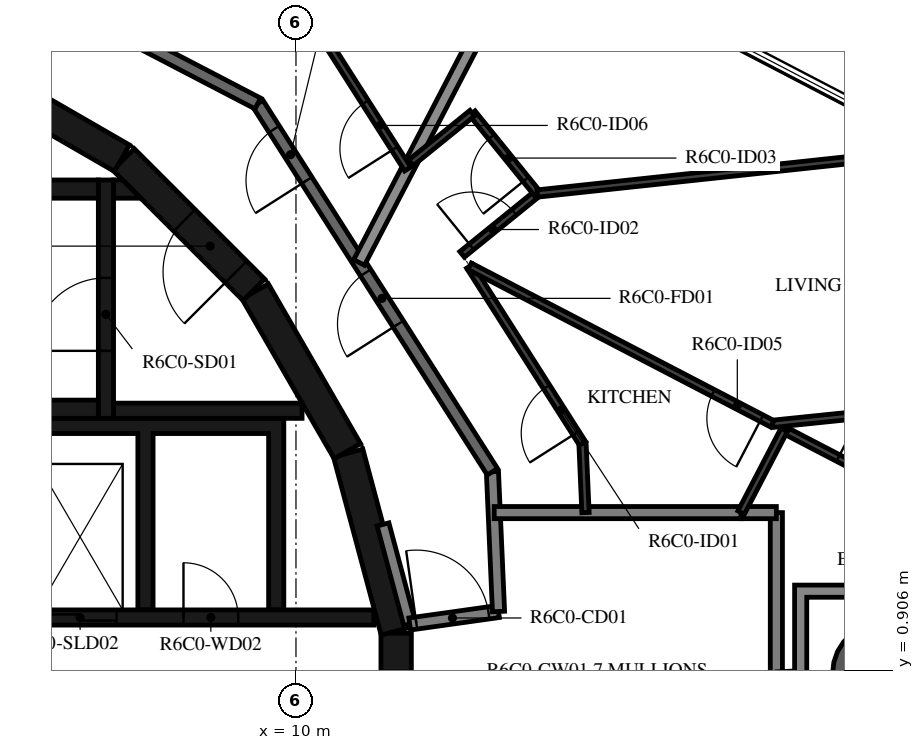
"""IFC4 building model, lengths in metres.
Left out: names, types, materials, properties, quantities, classifications, styles, units other than length and angle.
Written with IfcOpenShell. Run it as: python <this file> out.ifc"""

import sys

from ifc_helpers import new_model, si_unit, direction, frame, frame_2d, origin, origin_2d, place, context, subcontext, project, spatial, polyline, rectangle, hollow_circle, outline, extrude, element, fill, save


model = new_model("IFC4")
c1 = context("Model", 3, precision=1e-05, world=origin(), true_north=direction((0.0, 1.0)))
c2 = subcontext(c1, "Body", "Model", "MODEL_VIEW")
j1 = project(units=[si_unit("LENGTHUNIT", "METRE"), si_unit("PLANEANGLEUNIT", "RADIAN")], contexts=[c1])
p1 = place(None, origin())
s1 = spatial("IfcSite", under=j1, at=p1, CompositionType="ELEMENT")
p2 = place(p1, origin())
s2 = spatial("IfcBuilding", under=s1, at=p2, CompositionType="ELEMENT")
p3 = place(p2, frame((0.0, 0.0, 247.7)))
s3 = spatial("IfcBuildingStorey", under=s2, at=p3, CompositionType="ELEMENT", Elevation=247.7)
p4 = place(p3, frame((19.65, 0.858, -0.38), z_axis=(0.0, 0.0, 1.0), x_axis=(1.0, 0.0, 0.0)))
e1 = element("IfcColumn", 1, at=p4, inside=s3, PredefinedType="COLUMN", context=c2, shape_type="SweptSolid", body=[
    extrude(hollow_circle(Radius=0.825, WallThickness=0.04, at=origin_2d()), origin(), (0.0, 0.0, 1.0), 3.5),
])
p5 = place(p3, frame((11.647, -1.516, 0.0), z_axis=(0.0, 0.0, 1.0), x_axis=(0.0, 1.0, 0.0)))
e2 = element("IfcWall", 2, at=p5, inside=s3, PredefinedType="SHEAR", context=c2, shape_type="SweptSolid", body=[
    extrude(rectangle(XDim=3.033, YDim=0.5, at=frame_2d((1.516, 0.0))), origin(), (0.0, 0.0, 1.0), 3.12),
])
p6 = place(p5, frame((0.616, 0.0, 0.0)))
e3 = element("IfcOpeningElement", 3, at=p6, cuts=e2, PredefinedType="OPENING", context=c2, shape_type="SweptSolid", body=[
    extrude(rectangle(XDim=1.8, YDim=2.1, at=frame_2d((0.9, 1.05))), frame((0.0, 0.26, 0.0), z_axis=(0.0, -1.0, 0.0), x_axis=(1.0, 0.0, 0.0)), (0.0, 0.0, 1.0), 0.52),
])
for number, where, z_axis, x_axis in (
    (4, (11.643, 1.55, 0.0), (0.0, 0.0, 1.0), (-0.259, 0.966, 0.0)),
    (5, (10.845, 4.51, 0.0), (0.0, 0.0, 1.0), (-0.5, 0.866, 0.0)),
):
    element("IfcWall", number, at=place(p3, frame(where, z_axis=z_axis, x_axis=x_axis)), inside=s3, PredefinedType="SHEAR", context=c2, shape_type="SweptSolid", body=[
        extrude(rectangle(XDim=3.033, YDim=0.5, at=frame_2d((1.516, 0.0))), origin(), (0.0, 0.0, 1.0), 3.12),
    ])
p7 = place(p3, frame((9.308, 7.164, 0.0), z_axis=(0.0, 0.0, 1.0), x_axis=(-0.707106781187, 0.707106781187, 0.0)))
e6 = element("IfcWall", 6, at=p7, inside=s3, PredefinedType="SHEAR", context=c2, shape_type="SweptSolid", body=[
    extrude(rectangle(XDim=3.032, YDim=0.5, at=frame_2d((1.516, 0.0))), origin(), (0.0, 0.0, 1.0), 3.12),
])
p8 = place(p7, frame((0.416, 0.0, 0.0)))
e7 = element("IfcOpeningElement", 7, at=p8, cuts=e6, PredefinedType="OPENING", context=c2, shape_type="SweptSolid", body=[
    extrude(rectangle(XDim=1.2, YDim=2.1, at=frame_2d((0.6, 1.05))), frame((0.0, 0.26, 0.0), z_axis=(0.0, -1.0, 0.0), x_axis=(1.0, 0.0, 0.0)), (0.0, 0.0, 1.0), 0.52),
])
p9 = place(p3, frame((7.137, 9.329, 0.0), z_axis=(0.0, 0.0, 1.0), x_axis=(-0.865975092491, 0.500087131594, 0.0)))
e8 = element("IfcWall", 8, at=p9, inside=s3, PredefinedType="SHEAR", context=c2, shape_type="SweptSolid", body=[
    extrude(rectangle(XDim=3.033, YDim=0.5, at=frame_2d((1.516, 0.0))), origin(), (0.0, 0.0, 1.0), 3.12),
])
for number, where, z_axis, x_axis in (
    (9, (0.0, 5.2, 0.0), (0.0, 0.0, 1.0), (1.0, 0.0, 0.0)),
    (10, (0.0, 8.82, 0.0), (0.0, 0.0, 1.0), (1.0, 0.0, 0.0)),
):
    element("IfcWall", number, at=place(p3, frame(where, z_axis=z_axis, x_axis=x_axis)), inside=s3, PredefinedType="SHEAR", context=c2, shape_type="SweptSolid", body=[
        extrude(rectangle(XDim=6.75, YDim=0.3, at=frame_2d((3.375, 0.0))), origin(), (0.0, 0.0, 1.0), 3.12),
    ])
p10 = place(p3, frame((6.875, 5.05, 0.0), z_axis=(0.0, 0.0, 1.0), x_axis=(0.0, 1.0, 0.0)))
e11 = element("IfcWall", 11, at=p10, inside=s3, PredefinedType="SHEAR", context=c2, shape_type="SweptSolid", body=[
    extrude(rectangle(XDim=3.92, YDim=0.25, at=frame_2d((1.96, 0.0))), origin(), (0.0, 0.0, 1.0), 3.12),
])
p11 = place(p10, frame((1.11, 0.0, 0.0)))
e12 = element("IfcOpeningElement", 12, at=p11, cuts=e11, PredefinedType="OPENING", context=c2, shape_type="SweptSolid", body=[
    extrude(rectangle(XDim=1.2, YDim=2.1, at=frame_2d((0.6, 1.05))), frame((0.0, 0.135, 0.0), z_axis=(0.0, -1.0, 0.0), x_axis=(1.0, 0.0, 0.0)), (0.0, 0.0, 1.0), 0.27),
])
p12 = place(p3, frame((7.0, 5.175, 0.0), z_axis=(0.0, 0.0, 1.0), x_axis=(1.0, 0.0, 0.0)))
e13 = element("IfcWall", 13, at=p12, inside=s3, PredefinedType="SHEAR", context=c2, shape_type="SweptSolid", body=[
    extrude(rectangle(XDim=3.1, YDim=0.25, at=frame_2d((1.55, 0.0))), origin(), (0.0, 0.0, 1.0), 3.12),
])
p13 = place(p3, origin())
e14 = element("IfcWall", 14, at=p13, inside=s3, PredefinedType="SHEAR", context=c2, shape_type="SweptSolid", body=[
    extrude(outline(polyline([(7.448, 8.67), (7.0, 8.67), (7.0, 8.97), (7.148, 8.97), (7.448, 8.67)])), origin(), (0.0, 0.0, 1.0), 3.12),
])
p14 = place(p3, origin())
e15 = element("IfcWall", 15, at=p14, inside=s3, PredefinedType="SHEAR", context=c2, shape_type="SweptSolid", body=[
    extrude(outline(polyline([(-9.55, 4.8), (-1.2, 4.8), (-1.2, 1.9), (-0.95, 1.9), (-0.95, 4.8), (0.95, 4.8), (0.95, 1.9), (1.2, 1.9), (1.2, 4.8), (3.1, 4.8), (3.1, 1.9), (3.35, 1.9), (3.35, 4.8), (5.25, 4.8), (5.25, 1.9), (5.5, 1.9), (5.5, 4.8), (7.4, 4.8), (7.4, 1.9), (7.65, 1.9), (7.65, 4.8), (9.55, 4.8), (9.55, 1.9), (9.8, 1.9), (9.8, 4.8), (9.8, 5.05), (-9.8, 5.05), (-9.8, 4.8), (-9.8, 1.9), (-9.55, 1.9), (-9.55, 4.8)])), origin(), (0.0, 0.0, 1.0), 3.12),
])
p15 = place(p3, frame((3.35, 1.775, 0.0), z_axis=(0.0, 0.0, 1.0), x_axis=(1.0, 0.0, 0.0)))
e16 = element("IfcWall", 16, at=p15, inside=s3, PredefinedType="SHEAR", context=c2, shape_type="SweptSolid", body=[
    extrude(rectangle(XDim=7.93, YDim=0.25, at=frame_2d((3.965, 0.0))), origin(), (0.0, 0.0, 1.0), 3.12),
])
p16 = place(p15, frame((0.35, 0.0, 0.0)))
e17 = element("IfcOpeningElement", 17, at=p16, cuts=e16, PredefinedType="OPENING", context=c2, shape_type="SweptSolid", body=[
    extrude(rectangle(XDim=1.2, YDim=2.4, at=frame_2d((0.6, 1.2))), frame((0.0, 0.135, 0.0), z_axis=(0.0, -1.0, 0.0), x_axis=(1.0, 0.0, 0.0)), (0.0, 0.0, 1.0), 0.27),
])
p17 = place(p15, frame((2.5, 0.0, 0.0)))
e18 = element("IfcOpeningElement", 18, at=p17, cuts=e16, PredefinedType="OPENING", context=c2, shape_type="SweptSolid", body=[
    extrude(rectangle(XDim=1.2, YDim=2.4, at=frame_2d((0.6, 1.2))), frame((0.0, 0.135, 0.0), z_axis=(0.0, -1.0, 0.0), x_axis=(1.0, 0.0, 0.0)), (0.0, 0.0, 1.0), 0.27),
])
p18 = place(p15, frame((4.8, 0.0, 0.0)))
e19 = element("IfcOpeningElement", 19, at=p18, cuts=e16, PredefinedType="OPENING", context=c2, shape_type="SweptSolid", body=[
    extrude(rectangle(XDim=0.9, YDim=2.1, at=frame_2d((0.45, 1.05))), frame((0.0, 0.135, 0.0), z_axis=(0.0, -1.0, 0.0), x_axis=(1.0, 0.0, 0.0)), (0.0, 0.0, 1.0), 0.27),
])
p19 = place(p3, frame((11.87, 1.668, 0.0), z_axis=(0.0, 0.0, 1.0), x_axis=(-0.258836880648, 0.965921047093, 0.0)))
e20 = element("IfcWall", 20, at=p19, inside=s3, PredefinedType="STANDARD", context=c2, shape_type="SweptSolid", body=[
    extrude(rectangle(XDim=1.695, YDim=0.2, at=frame_2d((0.848, 0.0))), origin(), (0.0, 0.0, 1.0), 3.12),
])
p20 = place(p3, frame((11.87, 1.668, 0.0), z_axis=(0.0, 0.0, 1.0), x_axis=(0.990267985606, 0.139173692496, 0.0)))
e21 = element("IfcWall", 21, at=p20, inside=s3, PredefinedType="STANDARD", context=c2, shape_type="SweptSolid", body=[
    extrude(rectangle(XDim=1.475, YDim=0.2, at=frame_2d((0.738, 0.0))), origin(), (0.0, 0.0, 1.0), 3.12),
])
p21 = place(p20, frame((0.11, 0.0, 0.0)))
e22 = element("IfcOpeningElement", 22, at=p21, cuts=e21, PredefinedType="OPENING", context=c2, shape_type="SweptSolid", body=[
    extrude(rectangle(XDim=1.2, YDim=2.1, at=frame_2d((0.6, 1.05))), frame((0.0, 0.11, 0.0), z_axis=(0.0, -1.0, 0.0), x_axis=(1.0, 0.0, 0.0)), (0.0, 0.0, 1.0), 0.22),
])
p22 = place(p3, frame((13.331, 1.874, 0.0), z_axis=(0.0, 0.0, 1.0), x_axis=(-0.043621457762, 0.999048131184, 0.0)))
e23 = element("IfcWall", 23, at=p22, inside=s3, PredefinedType="STANDARD", context=c2, shape_type="SweptSolid", body=[
    extrude(rectangle(XDim=2.3, YDim=0.2, at=frame_2d((1.15, 0.0))), origin(), (0.0, 0.0, 1.0), 3.12),
])
p23 = place(p3, frame((13.231, 4.172, 0.0), z_axis=(0.0, 0.0, 1.0), x_axis=(-0.537304397561, 0.843388394728, 0.0)))
e24 = element("IfcWall", 24, at=p23, inside=s3, PredefinedType="STANDARD", context=c2, shape_type="SweptSolid", body=[
    extrude(rectangle(XDim=7.181, YDim=0.2, at=frame_2d((3.59, 0.0))), origin(), (0.0, 0.0, 1.0), 3.12),
])
p24 = place(p23, frame((2.881, 0.0, 0.0)))
e25 = element("IfcOpeningElement", 25, at=p24, cuts=e24, PredefinedType="OPENING", context=c2, shape_type="SweptSolid", body=[
    extrude(rectangle(XDim=1.0, YDim=2.1, at=frame_2d((0.5, 1.05))), frame((0.0, 0.11, 0.0), z_axis=(0.0, -1.0, 0.0), x_axis=(1.0, 0.0, 0.0)), (0.0, 0.0, 1.0), 0.22),
])
p25 = place(p23, frame((5.681, 0.0, 0.0)))
e26 = element("IfcOpeningElement", 26, at=p25, cuts=e24, PredefinedType="OPENING", context=c2, shape_type="SweptSolid", body=[
    extrude(rectangle(XDim=1.0, YDim=2.1, at=frame_2d((0.5, 1.05))), frame((0.0, 0.11, 0.0), z_axis=(0.0, -1.0, 0.0), x_axis=(1.0, 0.0, 0.0)), (0.0, 0.0, 1.0), 0.22),
])
p26 = place(p3, frame((9.372, 10.228, 0.0), z_axis=(0.0, 0.0, 1.0), x_axis=(-0.887005184532, 0.461759464021, 0.0)))
e27 = element("IfcWall", 27, at=p26, inside=s3, PredefinedType="STANDARD", context=c2, shape_type="SweptSolid", body=[
    extrude(rectangle(XDim=7.181, YDim=0.2, at=frame_2d((3.591, 0.0))), origin(), (0.0, 0.0, 1.0), 3.12),
])
p27 = place(p3, frame((17.321, 3.5, 0.0), z_axis=(0.0, 0.0, 1.0), x_axis=(-1.0, 0.0, 0.0)))
e28 = element("IfcWall", 28, at=p27, inside=s3, PredefinedType="STANDARD", context=c2, shape_type="SweptSolid", body=[
    extrude(rectangle(XDim=4.061, YDim=0.2, at=frame_2d((2.03, 0.0))), origin(), (0.0, 0.0, 1.0), 3.12),
])
p28 = place(p3, frame((17.9, -1.772, 0.0), z_axis=(0.0, 0.0, 1.0), x_axis=(0.0, 1.0, 0.0)))
e29 = element("IfcWall", 29, at=p28, inside=s3, PredefinedType="STANDARD", context=c2, shape_type="SweptSolid", body=[
    extrude(rectangle(XDim=5.272, YDim=0.2, at=frame_2d((2.636, 0.0))), origin(), (0.0, 0.0, 1.0), 3.12),
])
p29 = place(p3, frame((17.9, 3.5, 0.0), z_axis=(0.0, 0.0, 1.0), x_axis=(-1.0, 0.0, 0.0)))
e30 = element("IfcWall", 30, at=p29, inside=s3, PredefinedType="STANDARD", context=c2, shape_type="SweptSolid", body=[
    extrude(rectangle(XDim=0.579, YDim=0.2, at=frame_2d((0.29, 0.0))), origin(), (0.0, 0.0, 1.0), 3.12),
])
p30 = place(p3, frame((13.801, 12.922, 0.0), z_axis=(0.0, 0.0, 1.0), x_axis=(-0.461726485624, -0.887022351733, 0.0)))
e31 = element("IfcWall", 31, at=p30, inside=s3, PredefinedType="STANDARD", context=c2, shape_type="SweptSolid", body=[
    extrude(rectangle(XDim=5.984, YDim=0.2, at=frame_2d((2.992, 0.0))), origin(), (0.0, 0.0, 1.0), 2.73),
])
p31 = place(p3, frame((14.761, 3.5, 0.0), z_axis=(0.0, 0.0, 1.0), x_axis=(-0.04369750018, 0.999044808043, 0.0)))
e32 = element("IfcWall", 32, at=p31, inside=s3, PredefinedType="PARTITIONING", context=c2, shape_type="SweptSolid", body=[
    extrude(rectangle(XDim=1.14, YDim=0.12, at=frame_2d((0.57, 0.0))), origin(), (0.0, 0.0, 1.0), 3.12),
])
p32 = place(p3, frame((14.712, 4.639, 0.0), z_axis=(0.0, 0.0, 1.0), x_axis=(-0.537287126609, 0.843399397427, 0.0)))
e33 = element("IfcWall", 33, at=p32, inside=s3, PredefinedType="PARTITIONING", context=c2, shape_type="SweptSolid", body=[
    extrude(rectangle(XDim=3.453, YDim=0.12, at=frame_2d((1.727, 0.0))), origin(), (0.0, 0.0, 1.0), 3.12),
])
p33 = place(p32, frame((0.2, 0.0, 0.0)))
e34 = element("IfcOpeningElement", 34, at=p33, cuts=e33, PredefinedType="OPENING", context=c2, shape_type="SweptSolid", body=[
    extrude(rectangle(XDim=0.9, YDim=2.1, at=frame_2d((0.45, 1.05))), frame((0.0, 0.07, 0.0), z_axis=(0.0, -1.0, 0.0), x_axis=(1.0, 0.0, 0.0)), (0.0, 0.0, 1.0), 0.14),
])
p34 = place(p3, frame((12.732, 7.746, 0.0), z_axis=(0.0, 0.0, 1.0), x_axis=(0.777187694298, 0.62926885179, 0.0)))
e35 = element("IfcWall", 35, at=p34, inside=s3, PredefinedType="PARTITIONING", context=c2, shape_type="SweptSolid", body=[
    extrude(rectangle(XDim=1.591, YDim=0.12, at=frame_2d((0.795, 0.0))), origin(), (0.0, 0.0, 1.0), 3.12),
])
p35 = place(p34, frame((0.2, 0.0, 0.0)))
e36 = element("IfcOpeningElement", 36, at=p35, cuts=e35, PredefinedType="OPENING", context=c2, shape_type="SweptSolid", body=[
    extrude(rectangle(XDim=0.9, YDim=2.1, at=frame_2d((0.45, 1.05))), frame((0.0, 0.07, 0.0), z_axis=(0.0, -1.0, 0.0), x_axis=(1.0, 0.0, 0.0)), (0.0, 0.0, 1.0), 0.14),
])
p36 = place(p3, frame((13.969, 8.747, 0.0), z_axis=(0.0, 0.0, 1.0), x_axis=(-0.629359312443, 0.777114441921, 0.0)))
e37 = element("IfcWall", 37, at=p36, inside=s3, PredefinedType="PARTITIONING", context=c2, shape_type="SweptSolid", body=[
    extrude(rectangle(XDim=1.7, YDim=0.12, at=frame_2d((0.85, 0.0))), origin(), (0.0, 0.0, 1.0), 3.12),
])
p37 = place(p36, frame((0.3, 0.0, 0.0)))
e38 = element("IfcOpeningElement", 38, at=p37, cuts=e37, PredefinedType="OPENING", context=c2, shape_type="SweptSolid", body=[
    extrude(rectangle(XDim=0.9, YDim=2.1, at=frame_2d((0.45, 1.05))), frame((0.0, 0.07, 0.0), z_axis=(0.0, -1.0, 0.0), x_axis=(1.0, 0.0, 0.0)), (0.0, 0.0, 1.0), 0.14),
])
p38 = place(p3, frame((12.898, 10.069, 0.0), z_axis=(0.0, 0.0, 1.0), x_axis=(-0.777069405334, -0.629414918232, 0.0)))
e39 = element("IfcWall", 39, at=p38, inside=s3, PredefinedType="PARTITIONING", context=c2, shape_type="SweptSolid", body=[
    extrude(rectangle(XDim=1.296, YDim=0.12, at=frame_2d((0.648, 0.0))), origin(), (0.0, 0.0, 1.0), 3.12),
])
p39 = place(p3, frame((18.028, 4.859, 0.0), z_axis=(0.0, 0.0, 1.0), x_axis=(0.88702512027, -0.46172116695, 0.0)))
e40 = element("IfcWall", 40, at=p39, inside=s3, PredefinedType="PARTITIONING", context=c2, shape_type="SweptSolid", body=[
    extrude(rectangle(XDim=2.983, YDim=0.12, at=frame_2d((1.492, 0.0))), origin(), (0.0, 0.0, 1.0), 3.12),
])
p40 = place(p39, frame((1.0, 0.0, 0.0)))
e41 = element("IfcOpeningElement", 41, at=p40, cuts=e40, PredefinedType="OPENING", context=c2, shape_type="SweptSolid", body=[
    extrude(rectangle(XDim=0.8, YDim=2.1, at=frame_2d((0.4, 1.05))), frame((0.0, 0.07, 0.0), z_axis=(0.0, -1.0, 0.0), x_axis=(1.0, 0.0, 0.0)), (0.0, 0.0, 1.0), 0.14),
])
p41 = place(p3, frame((25.908, 5.79, 0.0), z_axis=(0.0, 0.0, 1.0), x_axis=(-0.994752982456, -0.102305932847, 0.0)))
e42 = element("IfcWall", 42, at=p41, inside=s3, PredefinedType="PARTITIONING", context=c2, shape_type="SweptSolid", body=[
    extrude(rectangle(XDim=8.116, YDim=0.12, at=frame_2d((4.058, 0.0))), origin(), (0.0, 0.0, 1.0), 3.12),
])
p42 = place(p41, frame((0.6, 0.0, 0.0)))
e43 = element("IfcOpeningElement", 43, at=p42, cuts=e42, PredefinedType="OPENING", context=c2, shape_type="SweptSolid", body=[
    extrude(rectangle(XDim=0.9, YDim=2.1, at=frame_2d((0.45, 1.05))), frame((0.0, 0.07, 0.0), z_axis=(0.0, -1.0, 0.0), x_axis=(1.0, 0.0, 0.0)), (0.0, 0.0, 1.0), 0.14),
])
p43 = place(p3, frame((18.028, 4.859, 0.0), z_axis=(0.0, 0.0, 1.0), x_axis=(-0.461688901614, -0.887041914526, 0.0)))
e44 = element("IfcWall", 44, at=p43, inside=s3, PredefinedType="PARTITIONING", context=c2, shape_type="SweptSolid", body=[
    extrude(rectangle(XDim=1.532, YDim=0.12, at=frame_2d((0.766, 0.0))), origin(), (0.0, 0.0, 1.0), 3.12),
])
p44 = place(p3, frame((17.834, 4.96, 0.0), z_axis=(0.0, 0.0, 1.0), x_axis=(-0.887008743782, 0.461752626906, 0.0)))
e45 = element("IfcWall", 45, at=p44, inside=s3, PredefinedType="PARTITIONING", context=c2, shape_type="SweptSolid", body=[
    extrude(rectangle(XDim=5.612, YDim=0.12, at=frame_2d((2.806, 0.0))), origin(), (0.0, 0.0, 1.0), 3.12),
])
p45 = place(p44, frame((0.2, 0.0, 0.0)))
e46 = element("IfcOpeningElement", 46, at=p45, cuts=e45, PredefinedType="OPENING", context=c2, shape_type="SweptSolid", body=[
    extrude(rectangle(XDim=0.9, YDim=2.1, at=frame_2d((0.45, 1.05))), frame((0.0, 0.07, 0.0), z_axis=(0.0, -1.0, 0.0), x_axis=(1.0, 0.0, 0.0)), (0.0, 0.0, 1.0), 0.14),
])
p46 = place(p3, frame((20.48, 9.445, 0.0), z_axis=(0.0, 0.0, 1.0), x_axis=(-0.994311974195, -0.106506797776, 0.0)))
e47 = element("IfcWall", 47, at=p46, inside=s3, PredefinedType="PARTITIONING", context=c2, shape_type="SweptSolid", body=[
    extrude(rectangle(XDim=6.549, YDim=0.12, at=frame_2d((3.274, 0.0))), origin(), (0.0, 0.0, 1.0), 3.12),
])
p47 = place(p3, frame((11.838, 9.15, 0.0), z_axis=(0.0, 0.0, 1.0), x_axis=(-0.537288949014, 0.843398236462, 0.0)))
e48 = element("IfcWall", 48, at=p47, inside=s3, PredefinedType="PARTITIONING", context=c2, shape_type="SweptSolid", body=[
    extrude(rectangle(XDim=2.636, YDim=0.12, at=frame_2d((1.318, 0.0))), origin(), (0.0, 0.0, 1.0), 3.12),
])
p48 = place(p47, frame((0.4, 0.0, 0.0)))
e49 = element("IfcOpeningElement", 49, at=p48, cuts=e48, PredefinedType="OPENING", context=c2, shape_type="SweptSolid", body=[
    extrude(rectangle(XDim=0.9, YDim=2.1, at=frame_2d((0.45, 1.05))), frame((0.0, 0.07, 0.0), z_axis=(0.0, -1.0, 0.0), x_axis=(1.0, 0.0, 0.0)), (0.0, 0.0, 1.0), 0.14),
])
p49 = place(p3, origin())
e50 = element("IfcWall", 50, at=p49, inside=s3, PredefinedType="STANDARD", context=c2, shape_type="SweptSolid", body=[
    extrude(outline(polyline([(21.1, 2.308), (21.1, -0.592), (18.2, -0.592), (18.2, 2.308), (21.1, 2.308)]), holes=[polyline([(18.4, -0.392), (20.9, -0.392), (20.9, 2.108), (18.4, 2.108), (18.4, -0.392)])]), origin(), (0.0, 0.0, 1.0), 3.12),
])
p50 = place(p11, origin())
e51 = element("IfcDoor", 51, at=p50, inside=s3, OperationType="SINGLE_SWING_LEFT", PredefinedType="DOOR", context=c2, shape_type="SweptSolid", body=[
    extrude(rectangle(XDim=1.2, YDim=2.1, at=frame_2d((0.6, 1.05))), frame((0.0, 0.025, 0.0), z_axis=(0.0, -1.0, 0.0), x_axis=(1.0, 0.0, 0.0)), (0.0, 0.0, 1.0), 0.05),
])
fill(e12, e51)
p51 = place(p8, origin())
e52 = element("IfcDoor", 52, at=p51, inside=s3, OperationType="SINGLE_SWING_RIGHT", PredefinedType="DOOR", context=c2, shape_type="SweptSolid", body=[
    extrude(rectangle(XDim=1.2, YDim=2.1, at=frame_2d((0.6, 1.05))), frame((0.0, 0.025, 0.0), z_axis=(0.0, -1.0, 0.0), x_axis=(1.0, 0.0, 0.0)), (0.0, 0.0, 1.0), 0.05),
])
fill(e7, e52)
p52 = place(p17, origin())
e53 = element("IfcDoor", 53, at=p52, inside=s3, OperationType="DOUBLE_DOOR_SLIDING", PredefinedType="DOOR", context=c2, shape_type="SweptSolid", body=[
    extrude(rectangle(XDim=1.2, YDim=2.4, at=frame_2d((0.6, 1.2))), frame((0.0, 0.025, 0.0), z_axis=(0.0, -1.0, 0.0), x_axis=(1.0, 0.0, 0.0)), (0.0, 0.0, 1.0), 0.05),
])
fill(e18, e53)
p53 = place(p18, origin())
e54 = element("IfcDoor", 54, at=p53, inside=s3, OperationType="SINGLE_SWING_RIGHT", PredefinedType="DOOR", context=c2, shape_type="SweptSolid", body=[
    extrude(rectangle(XDim=0.9, YDim=2.1, at=frame_2d((0.45, 1.05))), frame((0.0, 0.025, 0.0), z_axis=(0.0, -1.0, 0.0), x_axis=(1.0, 0.0, 0.0)), (0.0, 0.0, 1.0), 0.05),
])
fill(e19, e54)
p54 = place(p24, origin())
e55 = element("IfcDoor", 55, at=p54, inside=s3, OperationType="SINGLE_SWING_LEFT", PredefinedType="DOOR", context=c2, shape_type="SweptSolid", body=[
    extrude(rectangle(XDim=1.0, YDim=2.1, at=frame_2d((0.5, 1.05))), frame((0.0, 0.025, 0.0), z_axis=(0.0, -1.0, 0.0), x_axis=(1.0, 0.0, 0.0)), (0.0, 0.0, 1.0), 0.05),
])
fill(e25, e55)
p55 = place(p33, origin())
e56 = element("IfcDoor", 56, at=p55, inside=s3, OperationType="SINGLE_SWING_LEFT", PredefinedType="DOOR", context=c2, shape_type="SweptSolid", body=[
    extrude(rectangle(XDim=0.9, YDim=2.1, at=frame_2d((0.45, 1.05))), frame((0.0, 0.025, 0.0), z_axis=(0.0, -1.0, 0.0), x_axis=(1.0, 0.0, 0.0)), (0.0, 0.0, 1.0), 0.05),
])
fill(e34, e56)
p56 = place(p35, origin())
e57 = element("IfcDoor", 57, at=p56, inside=s3, OperationType="SINGLE_SWING_RIGHT", PredefinedType="DOOR", context=c2, shape_type="SweptSolid", body=[
    extrude(rectangle(XDim=0.9, YDim=2.1, at=frame_2d((0.45, 1.05))), frame((0.0, 0.025, 0.0), z_axis=(0.0, -1.0, 0.0), x_axis=(1.0, 0.0, 0.0)), (0.0, 0.0, 1.0), 0.05),
])
fill(e36, e57)
p57 = place(p37, origin())
e58 = element("IfcDoor", 58, at=p57, inside=s3, OperationType="SINGLE_SWING_LEFT", PredefinedType="DOOR", context=c2, shape_type="SweptSolid", body=[
    extrude(rectangle(XDim=0.9, YDim=2.1, at=frame_2d((0.45, 1.05))), frame((0.0, 0.025, 0.0), z_axis=(0.0, -1.0, 0.0), x_axis=(1.0, 0.0, 0.0)), (0.0, 0.0, 1.0), 0.05),
])
fill(e38, e58)
p58 = place(p40, origin())
e59 = element("IfcDoor", 59, at=p58, inside=s3, OperationType="SINGLE_SWING_RIGHT", PredefinedType="DOOR", context=c2, shape_type="SweptSolid", body=[
    extrude(rectangle(XDim=0.8, YDim=2.1, at=frame_2d((0.4, 1.05))), frame((0.0, 0.025, 0.0), z_axis=(0.0, -1.0, 0.0), x_axis=(1.0, 0.0, 0.0)), (0.0, 0.0, 1.0), 0.05),
])
fill(e41, e59)
p59 = place(p45, origin())
e60 = element("IfcDoor", 60, at=p59, inside=s3, OperationType="SINGLE_SWING_RIGHT", PredefinedType="DOOR", context=c2, shape_type="SweptSolid", body=[
    extrude(rectangle(XDim=0.9, YDim=2.1, at=frame_2d((0.45, 1.05))), frame((0.0, 0.025, 0.0), z_axis=(0.0, -1.0, 0.0), x_axis=(1.0, 0.0, 0.0)), (0.0, 0.0, 1.0), 0.05),
])
fill(e46, e60)
p60 = place(p25, origin())
e61 = element("IfcDoor", 61, at=p60, inside=s3, OperationType="SINGLE_SWING_LEFT", PredefinedType="DOOR", context=c2, shape_type="SweptSolid", body=[
    extrude(rectangle(XDim=1.0, YDim=2.1, at=frame_2d((0.5, 1.05))), frame((0.0, 0.025, 0.0), z_axis=(0.0, -1.0, 0.0), x_axis=(1.0, 0.0, 0.0)), (0.0, 0.0, 1.0), 0.05),
])
fill(e26, e61)
p61 = place(p48, origin())
e62 = element("IfcDoor", 62, at=p61, inside=s3, OperationType="SINGLE_SWING_LEFT", PredefinedType="DOOR", context=c2, shape_type="SweptSolid", body=[
    extrude(rectangle(XDim=0.9, YDim=2.1, at=frame_2d((0.45, 1.05))), frame((0.0, 0.025, 0.0), z_axis=(0.0, -1.0, 0.0), x_axis=(1.0, 0.0, 0.0)), (0.0, 0.0, 1.0), 0.05),
])
fill(e49, e62)
p62 = place(p21, origin())
e63 = element("IfcDoor", 63, at=p62, inside=s3, OperationType="DOUBLE_DOOR_SINGLE_SWING", PredefinedType="DOOR", context=c2, shape_type="SweptSolid", body=[
    extrude(rectangle(XDim=1.2, YDim=2.1, at=frame_2d((0.6, 1.05))), frame((0.0, 0.025, 0.0), z_axis=(0.0, -1.0, 0.0), x_axis=(1.0, 0.0, 0.0)), (0.0, 0.0, 1.0), 0.05),
])
fill(e22, e63)
save(model, sys.argv[1])
